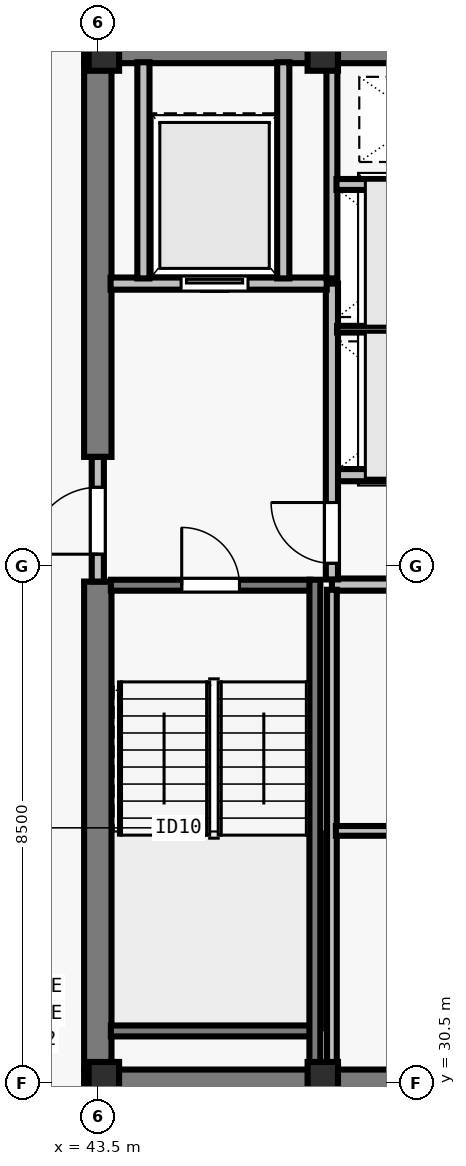
"""IFC4 building model, lengths in metres.
Left out: names, types, materials, properties, quantities, classifications, styles, units other than length and angle.
Written with IfcOpenShell. Run it as: python <this file> out.ifc"""

import sys

from ifc_helpers import new_model, si_unit, direction, frame, frame_2d, origin, origin_2d, place, context, subcontext, project, spatial, rectangle, i_section, extrude, element, fill, save


model = new_model("IFC4")
c1 = context("Model", 3, precision=1e-05, world=origin(), true_north=direction((0.0, 1.0)))
c2 = subcontext(c1, "Body", "Model", "MODEL_VIEW")
j1 = project(units=[si_unit("LENGTHUNIT", "METRE"), si_unit("PLANEANGLEUNIT", "RADIAN")], contexts=[c1])
p1 = place(None, origin())
s1 = spatial("IfcSite", under=j1, at=p1, CompositionType="ELEMENT")
p2 = place(p1, origin())
s2 = spatial("IfcBuilding", under=s1, at=p2, CompositionType="ELEMENT")
p3 = place(p2, frame((0.0, 0.0, 298.0)))
s3 = spatial("IfcBuildingStorey", under=s2, at=p3, CompositionType="ELEMENT", Elevation=298.0)
for number, where, z_axis, x_axis in (
    (1, (43.6, 30.6, 0.0), (0.0, 0.0, 1.0), (1.0, 0.0, 0.0)),
    (2, (47.2, 30.6, 0.0), (0.0, 0.0, 1.0), (1.0, 0.0, 0.0)),
    (3, (43.6, 47.4, 0.0), (0.0, 0.0, 1.0), (1.0, 0.0, 0.0)),
    (4, (47.2, 47.4, 0.0), (0.0, 0.0, 1.0), (1.0, 0.0, 0.0)),
):
    element("IfcColumn", number, at=place(p3, frame(where, z_axis=z_axis, x_axis=x_axis)), inside=s3, PredefinedType="COLUMN", context=c2, shape_type="SweptSolid", body=[
        extrude(i_section(OverallWidth=0.5, OverallDepth=0.5, WebThickness=0.028, FlangeThickness=0.045, at=origin_2d()), origin(), (0.0, 0.0, 1.0), 3.5),
    ])
for number, where, z_axis, x_axis in (
    (5, (43.275, 30.5, 0.0), (0.0, 0.0, 1.0), (1.0, 0.0, 0.0)),
    (6, (43.275, 47.5, 0.0), (0.0, 0.0, 1.0), (1.0, 0.0, 0.0)),
):
    element("IfcWall", number, at=place(p3, frame(where, z_axis=z_axis, x_axis=x_axis)), inside=s3, PredefinedType="SHEAR", context=c2, shape_type="SweptSolid", body=[
        extrude(rectangle(XDim=17.45, YDim=0.45, at=frame_2d((8.725, 0.0))), origin(), (0.0, 0.0, 1.0), 3.29),
    ])
p4 = place(p3, frame((43.5, 30.715, 0.0), z_axis=(0.0, 0.0, 1.0), x_axis=(0.0, 1.0, 0.0)))
e7 = element("IfcWall", 7, at=p4, inside=s3, PredefinedType="SHEAR", context=c2, shape_type="SweptSolid", body=[
    extrude(rectangle(XDim=8.035, YDim=0.45, at=frame_2d((4.018, 0.0))), origin(), (0.0, 0.0, 1.0), 3.29),
])
p5 = place(p3, frame((43.5, 40.8, 0.0), z_axis=(0.0, 0.0, 1.0), x_axis=(0.0, 1.0, 0.0)))
e8 = element("IfcWall", 8, at=p5, inside=s3, PredefinedType="SHEAR", context=c2, shape_type="SweptSolid", body=[
    extrude(rectangle(XDim=6.485, YDim=0.45, at=frame_2d((3.242, 0.0))), origin(), (0.0, 0.0, 1.0), 3.29),
])
for number, where, z_axis, x_axis in (
    (9, (47.35, 38.7, 0.0), (0.0, 0.0, 1.0), (1.0, 0.0, 0.0)),
    (10, (47.35, 40.5, 0.0), (0.0, 0.0, 1.0), (1.0, 0.0, 0.0)),
):
    element("IfcWall", number, at=place(p3, frame(where, z_axis=z_axis, x_axis=x_axis)), inside=s3, PredefinedType="SOLIDWALL", context=c2, shape_type="SweptSolid", body=[
        extrude(rectangle(XDim=2.95, YDim=0.2, at=frame_2d((1.475, 0.0))), origin(), (0.0, 0.0, 1.0), 3.29),
    ])
p6 = place(p3, frame((43.5, 38.75, 0.0), z_axis=(0.0, 0.0, 1.0), x_axis=(0.0, 1.0, 0.0)))
e11 = element("IfcWall", 11, at=p6, inside=s3, PredefinedType="SOLIDWALL", context=c2, shape_type="SweptSolid", body=[
    extrude(rectangle(XDim=2.05, YDim=0.2, at=frame_2d((1.025, 0.0))), origin(), (0.0, 0.0, 1.0), 3.29),
])
p7 = place(p6, frame((0.45, 0.0, 0.0)))
e12 = element("IfcOpeningElement", 12, at=p7, cuts=e11, PredefinedType="OPENING", context=c2, shape_type="SweptSolid", body=[
    extrude(rectangle(XDim=1.1, YDim=2.15, at=frame_2d((0.55, 1.075))), frame((0.0, 0.11, 0.0), z_axis=(0.0, -1.0, 0.0), x_axis=(1.0, 0.0, 0.0)), (0.0, 0.0, 1.0), 0.22),
])
p8 = place(p3, frame((47.35, 38.785, 0.0), z_axis=(0.0, 0.0, 1.0), x_axis=(0.0, 1.0, 0.0)))
e13 = element("IfcWall", 13, at=p8, inside=s3, PredefinedType="SOLIDWALL", context=c2, shape_type="SweptSolid", body=[
    extrude(rectangle(XDim=4.865, YDim=0.2, at=frame_2d((2.433, 0.0))), origin(), (0.0, 0.0, 1.0), 3.29),
])
p9 = place(p8, frame((0.265, 0.0, 0.0)))
e14 = element("IfcOpeningElement", 14, at=p9, cuts=e13, PredefinedType="OPENING", context=c2, shape_type="SweptSolid", body=[
    extrude(rectangle(XDim=1.0, YDim=2.15, at=frame_2d((0.5, 1.075))), frame((0.0, 0.11, 0.0), z_axis=(0.0, -1.0, 0.0), x_axis=(1.0, 0.0, 0.0)), (0.0, 0.0, 1.0), 0.22),
])
p10 = place(p3, frame((43.71, 43.65, 0.0), z_axis=(0.0, 0.0, 1.0), x_axis=(1.0, 0.0, 0.0)))
e15 = element("IfcWall", 15, at=p10, inside=s3, PredefinedType="SOLIDWALL", context=c2, shape_type="SweptSolid", body=[
    extrude(rectangle(XDim=3.555, YDim=0.2, at=frame_2d((1.777, 0.0))), origin(), (0.0, 0.0, 1.0), 3.29),
])
p11 = place(p10, frame((1.16, 0.0, 0.0)))
e16 = element("IfcOpeningElement", 16, at=p11, cuts=e15, PredefinedType="OPENING", context=c2, shape_type="SweptSolid", body=[
    extrude(rectangle(XDim=1.1, YDim=2.2, at=frame_2d((0.55, 1.1))), frame((0.0, 0.11, 0.0), z_axis=(0.0, -1.0, 0.0), x_axis=(1.0, 0.0, 0.0)), (0.0, 0.0, 1.0), 0.22),
])
for number, where, z_axis, x_axis in (
    (17, (46.55, 43.735, 0.0), (0.0, 0.0, 1.0), (0.0, 1.0, 0.0)),
    (18, (44.25, 43.735, 0.0), (0.0, 0.0, 1.0), (0.0, 1.0, 0.0)),
):
    element("IfcWall", number, at=place(p3, frame(where, z_axis=z_axis, x_axis=x_axis)), inside=s3, PredefinedType="SOLIDWALL", context=c2, shape_type="SweptSolid", body=[
        extrude(rectangle(XDim=3.555, YDim=0.2, at=frame_2d((1.777, 0.0))), origin(), (0.0, 0.0, 1.0), 3.29),
    ])
p12 = place(p3, frame((47.35, 30.71, 0.0), z_axis=(0.0, 0.0, 1.0), x_axis=(0.0, 1.0, 0.0)))
e19 = element("IfcWall", 19, at=p12, inside=s3, PredefinedType="PARTITIONING", context=c2, shape_type="SweptSolid", body=[
    extrude(rectangle(XDim=7.905, YDim=0.16, at=frame_2d((3.953, 0.0))), origin(), (0.0, 0.0, 1.0), 3.29),
])
p13 = place(p3, frame((47.415, 34.65, 0.0), z_axis=(0.0, 0.0, 1.0), x_axis=(1.0, 0.0, 0.0)))
e20 = element("IfcWall", 20, at=p13, inside=s3, PredefinedType="PARTITIONING", context=c2, shape_type="SweptSolid", body=[
    extrude(rectangle(XDim=2.8, YDim=0.16, at=frame_2d((1.4, 0.0))), origin(), (0.0, 0.0, 1.0), 3.29),
])
p14 = place(p3, frame((47.35, 43.735, 0.0), z_axis=(0.0, 0.0, 1.0), x_axis=(0.0, 1.0, 0.0)))
e21 = element("IfcWall", 21, at=p14, inside=s3, PredefinedType="SOLIDWALL", context=c2, shape_type="SweptSolid", body=[
    extrude(rectangle(XDim=3.555, YDim=0.18, at=frame_2d((1.777, 0.0))), origin(), (0.0, 0.0, 1.0), 3.29),
])
p15 = place(p3, frame((47.435, 42.9, 0.0), z_axis=(0.0, 0.0, 1.0), x_axis=(1.0, 0.0, 0.0)))
e22 = element("IfcWall", 22, at=p15, inside=s3, PredefinedType="PARTITIONING", context=c2, shape_type="SweptSolid", body=[
    extrude(rectangle(XDim=2.78, YDim=0.11, at=frame_2d((1.39, 0.0))), origin(), (0.0, 0.0, 1.0), 3.29),
])
p16 = place(p3, frame((47.425, 45.28, 0.0), z_axis=(0.0, 0.0, 1.0), x_axis=(1.0, 0.0, 0.0)))
e23 = element("IfcWall", 23, at=p16, inside=s3, PredefinedType="SOLIDWALL", context=c2, shape_type="SweptSolid", body=[
    extrude(rectangle(XDim=2.79, YDim=0.18, at=frame_2d((1.395, 0.0))), origin(), (0.0, 0.0, 1.0), 3.29),
])
p17 = place(p3, frame((43.715, 38.69, 0.0), z_axis=(0.0, 0.0, 1.0), x_axis=(1.0, 0.0, 0.0)))
e24 = element("IfcWall", 24, at=p17, inside=s3, PredefinedType="SOLIDWALL", context=c2, shape_type="SweptSolid", body=[
    extrude(rectangle(XDim=3.28, YDim=0.18, at=frame_2d((1.64, 0.0))), origin(), (0.0, 0.0, 1.0), 3.29),
])
p18 = place(p17, frame((1.165, 0.0, 0.0)))
e25 = element("IfcOpeningElement", 25, at=p18, cuts=e24, PredefinedType="OPENING", context=c2, shape_type="SweptSolid", body=[
    extrude(rectangle(XDim=0.95, YDim=2.15, at=frame_2d((0.475, 1.075))), frame((0.0, 0.1, 0.0), z_axis=(0.0, -1.0, 0.0), x_axis=(1.0, 0.0, 0.0)), (0.0, 0.0, 1.0), 0.2),
])
p19 = place(p3, frame((43.715, 31.36, 0.0), z_axis=(0.0, 0.0, 1.0), x_axis=(1.0, 0.0, 0.0)))
e26 = element("IfcWall", 26, at=p19, inside=s3, PredefinedType="SOLIDWALL", context=c2, shape_type="SweptSolid", body=[
    extrude(rectangle(XDim=3.28, YDim=0.18, at=frame_2d((1.64, 0.0))), origin(), (0.0, 0.0, 1.0), 3.29),
])
p20 = place(p3, frame((47.07, 38.78, 0.0), z_axis=(0.0, 0.0, 1.0), x_axis=(0.0, -1.0, 0.0)))
e27 = element("IfcWall", 27, at=p20, inside=s3, PredefinedType="SOLIDWALL", context=c2, shape_type="SweptSolid", body=[
    extrude(rectangle(XDim=8.067, YDim=0.18, at=frame_2d((4.034, 0.0))), origin(), (0.0, 0.0, 1.0), 3.29),
])
p21 = place(p7, origin())
e28 = element("IfcDoor", 28, at=p21, inside=s3, OperationType="SINGLE_SWING_LEFT", PredefinedType="DOOR", context=c2, shape_type="SweptSolid", body=[
    extrude(rectangle(XDim=1.1, YDim=2.15, at=frame_2d((0.55, 1.075))), frame((0.0, 0.025, 0.0), z_axis=(0.0, -1.0, 0.0), x_axis=(1.0, 0.0, 0.0)), (0.0, 0.0, 1.0), 0.05),
])
fill(e12, e28)
p22 = place(p9, origin())
e29 = element("IfcDoor", 29, at=p22, inside=s3, OperationType="SINGLE_SWING_RIGHT", PredefinedType="DOOR", context=c2, shape_type="SweptSolid", body=[
    extrude(rectangle(XDim=1.0, YDim=2.15, at=frame_2d((0.5, 1.075))), frame((0.0, 0.025, 0.0), z_axis=(0.0, -1.0, 0.0), x_axis=(1.0, 0.0, 0.0)), (0.0, 0.0, 1.0), 0.05),
])
fill(e14, e29)
p23 = place(p11, origin())
e30 = element("IfcDoor", 30, at=p23, inside=s3, OperationType="SLIDING_TO_LEFT", PredefinedType="DOOR", context=c2, shape_type="SweptSolid", body=[
    extrude(rectangle(XDim=1.1, YDim=2.2, at=frame_2d((0.55, 1.1))), frame((0.0, 0.025, 0.0), z_axis=(0.0, -1.0, 0.0), x_axis=(1.0, 0.0, 0.0)), (0.0, 0.0, 1.0), 0.05),
])
fill(e16, e30)
p24 = place(p18, origin())
e31 = element("IfcDoor", 31, at=p24, inside=s3, OperationType="SINGLE_SWING_LEFT", PredefinedType="DOOR", context=c2, shape_type="SweptSolid", body=[
    extrude(rectangle(XDim=0.95, YDim=2.15, at=frame_2d((0.475, 1.075))), frame((0.0, 0.025, 0.0), z_axis=(0.0, -1.0, 0.0), x_axis=(1.0, 0.0, 0.0)), (0.0, 0.0, 1.0), 0.05),
])
fill(e25, e31)
save(model, sys.argv[1])
